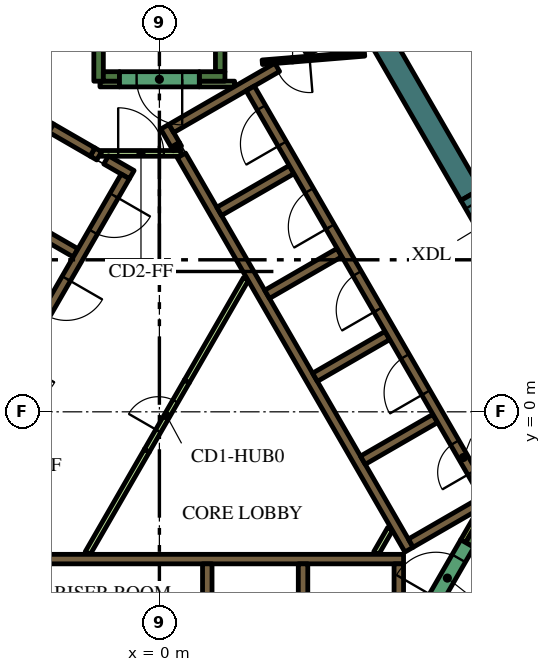
"""IFC4 building model, lengths in metres.
Left out: names, types, materials, properties, quantities, classifications, styles, units other than length and angle.
Written with IfcOpenShell. Run it as: python <this file> out.ifc"""

import sys

from ifc_helpers import new_model, si_unit, direction, frame, frame_2d, origin, place, context, subcontext, project, spatial, rectangle, extrude, element, fill, save


model = new_model("IFC4")
c1 = context("Model", 3, precision=1e-05, world=origin(), true_north=direction((0.0, 1.0)))
c2 = subcontext(c1, "Body", "Model", "MODEL_VIEW")
j1 = project(units=[si_unit("LENGTHUNIT", "METRE"), si_unit("PLANEANGLEUNIT", "RADIAN")], contexts=[c1])
p1 = place(None, origin())
s1 = spatial("IfcSite", under=j1, at=p1, CompositionType="ELEMENT")
p2 = place(p1, origin())
s2 = spatial("IfcBuilding", under=s1, at=p2, CompositionType="ELEMENT")
p3 = place(p2, frame((0.0, 0.0, 309.0)))
s3 = spatial("IfcBuildingStorey", under=s2, at=p3, CompositionType="ELEMENT", Elevation=309.0)
p4 = place(p3, frame((1.989, 16.456, 0.0), z_axis=(0.0, 0.0, 1.0), x_axis=(0.49999102663, -0.8660305845, 0.0)))
e1 = element("IfcWall", 1, at=p4, inside=s3, PredefinedType="SOLIDWALL", context=c2, shape_type="SweptSolid", body=[
    extrude(rectangle(XDim=12.406, YDim=0.6, at=frame_2d((6.203, 0.0))), origin(), (0.0, 0.0, 1.0), 4.2),
])
p5 = place(p3, frame((8.168, -3.503, 0.0), z_axis=(0.0, 0.0, 1.0), x_axis=(0.49972245349, 0.866185586049, 0.0)))
e2 = element("IfcWall", 2, at=p5, inside=s3, PredefinedType="SOLIDWALL", context=c2, shape_type="SweptSolid", body=[
    extrude(rectangle(XDim=0.425, YDim=0.25, at=frame_2d((0.212, 0.0))), origin(), (0.0, 0.0, 1.0), 4.2),
])
p6 = place(p3, frame((1.6, 8.95, 0.0), z_axis=(0.0, 0.0, 1.0), x_axis=(0.0, 1.0, 0.0)))
e3 = element("IfcWall", 3, at=p6, inside=s3, PredefinedType="SOLIDWALL", context=c2, shape_type="SweptSolid", body=[
    extrude(rectangle(XDim=6.8, YDim=0.25, at=frame_2d((3.4, 0.0))), origin(), (0.0, 0.0, 1.0), 4.2),
])
p7 = place(p3, frame((1.05, 8.825, 0.0), z_axis=(0.0, 0.0, 1.0), x_axis=(1.0, 0.0, 0.0)))
e4 = element("IfcWall", 4, at=p7, inside=s3, PredefinedType="SOLIDWALL", context=c2, shape_type="SweptSolid", body=[
    extrude(rectangle(XDim=0.675, YDim=0.25, at=frame_2d((0.337, 0.0))), origin(), (0.0, 0.0, 1.0), 4.2),
])
p8 = place(p3, frame((-1.6, 8.7, 0.0), z_axis=(0.0, 0.0, 1.0), x_axis=(0.0, 1.0, 0.0)))
e5 = element("IfcWall", 5, at=p8, inside=s3, PredefinedType="SOLIDWALL", context=c2, shape_type="SweptSolid", body=[
    extrude(rectangle(XDim=7.05, YDim=0.25, at=frame_2d((3.525, 0.0))), origin(), (0.0, 0.0, 1.0), 4.2),
])
p9 = place(p3, frame((-1.475, 8.825, 0.0), z_axis=(0.0, 0.0, 1.0), x_axis=(1.0, 0.0, 0.0)))
e6 = element("IfcWall", 6, at=p9, inside=s3, PredefinedType="SOLIDWALL", context=c2, shape_type="SweptSolid", body=[
    extrude(rectangle(XDim=0.425, YDim=0.25, at=frame_2d((0.212, 0.0))), origin(), (0.0, 0.0, 1.0), 4.2),
])
p10 = place(p3, frame((-5.545, -3.875, 0.0), z_axis=(0.0, 0.0, 1.0), x_axis=(1.0, 0.0, 0.0)))
e7 = element("IfcWall", 7, at=p10, inside=s3, PredefinedType="SOLIDWALL", context=c2, shape_type="SweptSolid", body=[
    extrude(rectangle(XDim=11.97, YDim=0.25, at=frame_2d((5.985, 0.0))), origin(), (0.0, 0.0, 1.0), 4.2),
])
p11 = place(p3, frame((6.3, -7.24, 0.0), z_axis=(0.0, 0.0, 1.0), x_axis=(0.0, 1.0, 0.0)))
e8 = element("IfcWall", 8, at=p11, inside=s3, PredefinedType="SOLIDWALL", context=c2, shape_type="SweptSolid", body=[
    extrude(rectangle(XDim=3.24, YDim=0.25, at=frame_2d((1.62, 0.0))), origin(), (0.0, 0.0, 1.0), 4.2),
])
for number, where, z_axis, x_axis in (
    (9, (3.78, -4.0, 0.0), (0.0, 0.0, 1.0), (0.0, -1.0, 0.0)),
    (10, (1.26, -4.0, 0.0), (0.0, 0.0, 1.0), (0.0, -1.0, 0.0)),
):
    element("IfcWall", number, at=place(p3, frame(where, z_axis=z_axis, x_axis=x_axis)), inside=s3, PredefinedType="SOLIDWALL", context=c2, shape_type="SweptSolid", body=[
        extrude(rectangle(XDim=2.2, YDim=0.25, at=frame_2d((1.1, 0.0))), origin(), (0.0, 0.0, 1.0), 4.2),
    ])
p12 = place(p3, frame((0.473, 6.93, 0.0), z_axis=(0.0, 0.0, 1.0), x_axis=(-0.49972245349, 0.866185586049, 0.0)))
e11 = element("IfcWall", 11, at=p12, inside=s3, PredefinedType="SOLIDWALL", context=c2, shape_type="SweptSolid", body=[
    extrude(rectangle(XDim=0.11, YDim=0.25, at=frame_2d((0.055, 0.0))), origin(), (0.0, 0.0, 1.0), 4.2),
])
p13 = place(p3, frame((6.568, -3.627, 0.0), z_axis=(0.0, 0.0, 1.0), x_axis=(-0.499999455981, 0.866025717874, 0.0)))
e12 = element("IfcWall", 12, at=p13, inside=s3, PredefinedType="SOLIDWALL", context=c2, shape_type="SweptSolid", body=[
    extrude(rectangle(XDim=11.978, YDim=0.25, at=frame_2d((5.989, 0.0))), origin(), (0.0, 0.0, 1.0), 4.2),
])
p14 = place(p3, frame((0.417, 7.027, 0.0), z_axis=(0.0, 0.0, 1.0), x_axis=(-0.500210807569, 0.865903659763, 0.0)))
e13 = element("IfcWall", 13, at=p14, inside=s3, PredefinedType="SOLIDWALL", context=c2, shape_type="SweptSolid", body=[
    extrude(rectangle(XDim=0.548, YDim=0.25, at=frame_2d((0.274, 0.0))), origin(), (0.0, 0.0, 1.0), 4.2),
])
p15 = place(p3, frame((3.1, 9.064, 0.0), z_axis=(0.0, 0.0, 1.0), x_axis=(-0.866030133475, -0.499991807846, 0.0)))
e14 = element("IfcWall", 14, at=p15, inside=s3, PredefinedType="SOLIDWALL", context=c2, shape_type="SweptSolid", body=[
    extrude(rectangle(XDim=3.217, YDim=0.25, at=frame_2d((1.608, 0.0))), origin(), (0.0, 0.0, 1.0), 4.2),
])
p16 = place(p3, frame((1.574, 5.274, 0.0), z_axis=(0.0, 0.0, 1.0), x_axis=(0.866028486751, 0.499994660107, 0.0)))
e15 = element("IfcWall", 15, at=p16, inside=s3, PredefinedType="SOLIDWALL", context=c2, shape_type="SweptSolid", body=[
    extrude(rectangle(XDim=2.2, YDim=0.25, at=frame_2d((1.1, 0.0))), origin(), (0.0, 0.0, 1.0), 4.2),
])
for number, where, z_axis, x_axis in (
    (16, (2.834, 3.091, 0.0), (0.0, 0.0, 1.0), (0.866, 0.5, 0.0)),
    (17, (4.094, 0.909, 0.0), (0.0, 0.0, 1.0), (0.866, 0.5, 0.0)),
    (18, (5.354, -1.274, 0.0), (0.0, 0.0, 1.0), (0.866, 0.5, 0.0)),
):
    element("IfcWall", number, at=place(p3, frame(where, z_axis=z_axis, x_axis=x_axis)), inside=s3, PredefinedType="SOLIDWALL", context=c2, shape_type="SweptSolid", body=[
        extrude(rectangle(XDim=2.2, YDim=0.25, at=frame_2d((1.1, 0.0))), origin(), (0.0, 0.0, 1.0), 4.2),
    ])
p17 = place(p3, frame((6.614, -3.456, 0.0), z_axis=(0.0, 0.0, 1.0), x_axis=(0.866032512851, 0.499987686533, 0.0)))
e19 = element("IfcWall", 19, at=p17, inside=s3, PredefinedType="SOLIDWALL", context=c2, shape_type="SweptSolid", body=[
    extrude(rectangle(XDim=2.975, YDim=0.25, at=frame_2d((1.487, 0.0))), origin(), (0.0, 0.0, 1.0), 4.2),
])
p18 = place(p3, frame((3.83, 9.486, 0.0), z_axis=(0.0, 0.0, 1.0), x_axis=(0.865986202621, 0.500067892261, 0.0)))
e20 = element("IfcWall", 20, at=p18, inside=s3, PredefinedType="SOLIDWALL", context=c2, shape_type="SweptSolid", body=[
    extrude(rectangle(XDim=1.591, YDim=0.25, at=frame_2d((0.795, 0.0))), origin(), (0.0, 0.0, 1.0), 4.2),
])
p19 = place(p3, frame((-8.06, -1.311, 0.0), z_axis=(0.0, 0.0, 1.0), x_axis=(0.50000273126, 0.866023826885, 0.0)))
e21 = element("IfcWall", 21, at=p19, inside=s3, PredefinedType="SOLIDWALL", context=c2, shape_type="SweptSolid", body=[
    extrude(rectangle(XDim=10.33, YDim=0.25, at=frame_2d((5.165, 0.0))), origin(), (0.0, 0.0, 1.0), 4.2),
])
p20 = place(p3, frame((-1.758, 6.835, 0.0), z_axis=(0.0, 0.0, 1.0), x_axis=(0.865982457891, -0.500074377092, 0.0)))
e22 = element("IfcWall", 22, at=p20, inside=s3, PredefinedType="SOLIDWALL", context=c2, shape_type="SweptSolid", body=[
    extrude(rectangle(XDim=0.2, YDim=0.25, at=frame_2d((0.1, 0.0))), origin(), (0.0, 0.0, 1.0), 4.2),
])
p21 = place(p3, frame((-1.76, 6.836, 0.0), z_axis=(0.0, 0.0, 1.0), x_axis=(-0.865952863304, 0.500125622755, 0.0)))
e23 = element("IfcWall", 23, at=p21, inside=s3, PredefinedType="SOLIDWALL", context=c2, shape_type="SweptSolid", body=[
    extrude(rectangle(XDim=1.258, YDim=0.25, at=frame_2d((0.629, 0.0))), origin(), (0.0, 0.0, 1.0), 4.2),
])
p22 = place(p3, frame((-0.728, 6.24, 0.0), z_axis=(0.0, 0.0, 1.0), x_axis=(-0.865955664968, 0.500120771724, 0.0)))
e24 = element("IfcWall", 24, at=p22, inside=s3, PredefinedType="SOLIDWALL", context=c2, shape_type="SweptSolid", body=[
    extrude(rectangle(XDim=0.778, YDim=0.25, at=frame_2d((0.389, 0.0))), origin(), (0.0, 0.0, 1.0), 4.2),
])
p23 = place(p3, frame((-2.204, 4.182, 0.0), z_axis=(0.0, 0.0, 1.0), x_axis=(-0.866008176907, 0.50002983664, 0.0)))
e25 = element("IfcWall", 25, at=p23, inside=s3, PredefinedType="SOLIDWALL", context=c2, shape_type="SweptSolid", body=[
    extrude(rectangle(XDim=2.2, YDim=0.25, at=frame_2d((1.1, 0.0))), origin(), (0.0, 0.0, 1.0), 4.2),
])
p24 = place(p3, frame((1.05, 8.625, 0.0), z_axis=(0.0, 0.0, 1.0), x_axis=(1.0, 0.0, 0.0)))
e26 = element("IfcWall", 26, at=p24, inside=s3, PredefinedType="PARTITIONING", context=c2, shape_type="SweptSolid", body=[
    extrude(rectangle(XDim=0.929, YDim=0.15, at=frame_2d((0.464, 0.0))), origin(), (0.0, 0.0, 1.0), 3.55),
])
p25 = place(p3, frame((-1.564, 8.625, 0.0), z_axis=(0.0, 0.0, 1.0), x_axis=(1.0, 0.0, 0.0)))
e27 = element("IfcWall", 27, at=p25, inside=s3, PredefinedType="PARTITIONING", context=c2, shape_type="SweptSolid", body=[
    extrude(rectangle(XDim=0.514, YDim=0.15, at=frame_2d((0.257, 0.0))), origin(), (0.0, 0.0, 1.0), 3.55),
])
p26 = place(p3, frame((8.459, -2.599, 0.0), z_axis=(0.0, 0.0, 1.0), x_axis=(-0.500041054325, -0.866001699761, 0.0)))
e28 = element("IfcWall", 28, at=p26, inside=s3, PredefinedType="PARTITIONING", context=c2, shape_type="SweptSolid", body=[
    extrude(rectangle(XDim=0.929, YDim=0.15, at=frame_2d((0.464, 0.0))), origin(), (0.0, 0.0, 1.0), 4.2),
])
p27 = place(p3, frame((5.705, -3.718, 0.0), z_axis=(0.0, 0.0, 1.0), x_axis=(0.499962090823, 0.866047289552, 0.0)))
e29 = element("IfcWall", 29, at=p27, inside=s3, PredefinedType="PARTITIONING", context=c2, shape_type="SweptSolid", body=[
    extrude(rectangle(XDim=0.735, YDim=0.15, at=frame_2d((0.367, 0.0))), origin(), (0.0, 0.0, 1.0), 3.55),
])
p28 = place(p3, frame((-1.887, -3.718, 0.0), z_axis=(0.0, 0.0, 1.0), x_axis=(0.500043732237, 0.866000153493, 0.0)))
e30 = element("IfcWall", 30, at=p28, inside=s3, PredefinedType="PARTITIONING", context=c2, shape_type="SweptSolid", body=[
    extrude(rectangle(XDim=3.114, YDim=0.15, at=frame_2d((1.557, 0.0))), origin(), (0.0, 0.0, 1.0), 3.55),
])
p29 = place(p3, frame((0.72, 0.797, 0.0), z_axis=(0.0, 0.0, 1.0), x_axis=(0.499984921984, 0.866034108906, 0.0)))
e31 = element("IfcWall", 31, at=p29, inside=s3, PredefinedType="PARTITIONING", context=c2, shape_type="SweptSolid", body=[
    extrude(rectangle(XDim=3.113, YDim=0.15, at=frame_2d((1.557, 0.0))), origin(), (0.0, 0.0, 1.0), 3.55),
])
p30 = place(p3, frame((8.565, -2.185, 0.0), z_axis=(0.0, 0.0, 1.0), x_axis=(-0.499997954832, 0.866026584559, 0.0)))
e32 = element("IfcWall", 32, at=p30, inside=s3, PredefinedType="SOLIDWALL", context=c2, shape_type="SweptSolid", body=[
    extrude(rectangle(XDim=12.35, YDim=0.25, at=frame_2d((6.175, 0.0))), origin(), (0.0, 0.0, 1.0), 4.2),
])
p31 = place(p30, frame((0.685, 0.0, 0.0)))
e33 = element("IfcOpeningElement", 33, at=p31, cuts=e32, PredefinedType="OPENING", context=c2, shape_type="SweptSolid", body=[
    extrude(rectangle(XDim=0.9, YDim=2.1, at=frame_2d((0.45, 1.05))), frame((0.0, 0.135, 0.0), z_axis=(0.0, -1.0, 0.0), x_axis=(1.0, 0.0, 0.0)), (0.0, 0.0, 1.0), 0.27),
])
p32 = place(p30, frame((3.105, 0.0, 0.0)))
e34 = element("IfcOpeningElement", 34, at=p32, cuts=e32, PredefinedType="OPENING", context=c2, shape_type="SweptSolid", body=[
    extrude(rectangle(XDim=1.1, YDim=2.1, at=frame_2d((0.55, 1.05))), frame((0.0, 0.135, 0.0), z_axis=(0.0, -1.0, 0.0), x_axis=(1.0, 0.0, 0.0)), (0.0, 0.0, 1.0), 0.27),
])
p33 = place(p30, frame((5.625, 0.0, 0.0)))
e35 = element("IfcOpeningElement", 35, at=p33, cuts=e32, PredefinedType="OPENING", context=c2, shape_type="SweptSolid", body=[
    extrude(rectangle(XDim=1.1, YDim=2.1, at=frame_2d((0.55, 1.05))), frame((0.0, 0.135, 0.0), z_axis=(0.0, -1.0, 0.0), x_axis=(1.0, 0.0, 0.0)), (0.0, 0.0, 1.0), 0.27),
])
p34 = place(p30, frame((8.145, 0.0, 0.0)))
e36 = element("IfcOpeningElement", 36, at=p34, cuts=e32, PredefinedType="OPENING", context=c2, shape_type="SweptSolid", body=[
    extrude(rectangle(XDim=1.1, YDim=2.1, at=frame_2d((0.55, 1.05))), frame((0.0, 0.135, 0.0), z_axis=(0.0, -1.0, 0.0), x_axis=(1.0, 0.0, 0.0)), (0.0, 0.0, 1.0), 0.27),
])
p35 = place(p30, frame((10.665, 0.0, 0.0)))
e37 = element("IfcOpeningElement", 37, at=p35, cuts=e32, PredefinedType="OPENING", context=c2, shape_type="SweptSolid", body=[
    extrude(rectangle(XDim=1.1, YDim=2.1, at=frame_2d((0.55, 1.05))), frame((0.0, 0.135, 0.0), z_axis=(0.0, -1.0, 0.0), x_axis=(1.0, 0.0, 0.0)), (0.0, 0.0, 1.0), 0.27),
])
p36 = place(p3, frame((-0.898, 6.194, 0.0), z_axis=(0.0, 0.0, 1.0), x_axis=(-0.499996202215, -0.866027596426, 0.0)))
e38 = element("IfcWall", 38, at=p36, inside=s3, PredefinedType="SOLIDWALL", context=c2, shape_type="SweptSolid", body=[
    extrude(rectangle(XDim=9.83, YDim=0.25, at=frame_2d((4.915, 0.0))), origin(), (0.0, 0.0, 1.0), 4.2),
])
p37 = place(p36, frame((0.585, 0.0, 0.0)))
e39 = element("IfcOpeningElement", 39, at=p37, cuts=e38, PredefinedType="OPENING", context=c2, shape_type="SweptSolid", body=[
    extrude(rectangle(XDim=1.1, YDim=2.1, at=frame_2d((0.55, 1.05))), frame((0.0, 0.135, 0.0), z_axis=(0.0, -1.0, 0.0), x_axis=(1.0, 0.0, 0.0)), (0.0, 0.0, 1.0), 0.27),
])
p38 = place(p36, frame((3.105, 0.0, 0.0)))
e40 = element("IfcOpeningElement", 40, at=p38, cuts=e38, PredefinedType="OPENING", context=c2, shape_type="SweptSolid", body=[
    extrude(rectangle(XDim=1.1, YDim=2.1, at=frame_2d((0.55, 1.05))), frame((0.0, 0.135, 0.0), z_axis=(0.0, -1.0, 0.0), x_axis=(1.0, 0.0, 0.0)), (0.0, 0.0, 1.0), 0.27),
])
p39 = place(p36, frame((5.625, 0.0, 0.0)))
e41 = element("IfcOpeningElement", 41, at=p39, cuts=e38, PredefinedType="OPENING", context=c2, shape_type="SweptSolid", body=[
    extrude(rectangle(XDim=1.1, YDim=2.1, at=frame_2d((0.55, 1.05))), frame((0.0, 0.135, 0.0), z_axis=(0.0, -1.0, 0.0), x_axis=(1.0, 0.0, 0.0)), (0.0, 0.0, 1.0), 0.27),
])
p40 = place(p36, frame((8.145, 0.0, 0.0)))
e42 = element("IfcOpeningElement", 42, at=p40, cuts=e38, PredefinedType="OPENING", context=c2, shape_type="SweptSolid", body=[
    extrude(rectangle(XDim=1.1, YDim=2.1, at=frame_2d((0.55, 1.05))), frame((0.0, 0.135, 0.0), z_axis=(0.0, -1.0, 0.0), x_axis=(1.0, 0.0, 0.0)), (0.0, 0.0, 1.0), 0.27),
])
p41 = place(p3, frame((7.053, -5.284, 0.0), z_axis=(0.0, 0.0, 1.0), x_axis=(0.500078061341, 0.865980330357, 0.0)))
e43 = element("IfcWall", 43, at=p41, inside=s3, PredefinedType="SOLIDWALL", context=c2, shape_type="SweptSolid", body=[
    extrude(rectangle(XDim=2.1, YDim=0.4, at=frame_2d((1.05, 0.0))), origin(), (0.0, 0.0, 1.0), 4.2),
])
p42 = place(p41, frame((0.45, 0.0, 0.0)))
e44 = element("IfcOpeningElement", 44, at=p42, cuts=e43, PredefinedType="OPENING", context=c2, shape_type="SweptSolid", body=[
    extrude(rectangle(XDim=1.2, YDim=2.1, at=frame_2d((0.6, 1.05))), frame((0.0, 0.21, 0.0), z_axis=(0.0, -1.0, 0.0), x_axis=(1.0, 0.0, 0.0)), (0.0, 0.0, 1.0), 0.42),
])
p43 = place(p3, frame((1.05, 8.75, 0.0), z_axis=(0.0, 0.0, 1.0), x_axis=(-1.0, 0.0, 0.0)))
e45 = element("IfcWall", 45, at=p43, inside=s3, PredefinedType="SOLIDWALL", context=c2, shape_type="SweptSolid", body=[
    extrude(rectangle(XDim=2.1, YDim=0.4, at=frame_2d((1.05, 0.0))), origin(), (0.0, 0.0, 1.0), 4.2),
])
p44 = place(p43, frame((0.45, 0.0, 0.0)))
e46 = element("IfcOpeningElement", 46, at=p44, cuts=e45, PredefinedType="OPENING", context=c2, shape_type="SweptSolid", body=[
    extrude(rectangle(XDim=1.2, YDim=2.1, at=frame_2d((0.6, 1.05))), frame((0.0, 0.21, 0.0), z_axis=(0.0, -1.0, 0.0), x_axis=(1.0, 0.0, 0.0)), (0.0, 0.0, 1.0), 0.42),
])
p45 = place(p3, frame((5.398, 9.419, 0.0), z_axis=(0.0, 0.0, 1.0), x_axis=(-0.996653416376, -0.081743303248, 0.0)))
e47 = element("IfcWall", 47, at=p45, inside=s3, PredefinedType="PARTITIONING", context=c2, shape_type="SweptSolid", body=[
    extrude(rectangle(XDim=2.7, YDim=0.12, at=frame_2d((1.35, 0.0))), origin(), (0.0, 0.0, 1.0), 3.55),
])
p46 = place(p45, frame((1.45, 0.0, 0.0)))
e48 = element("IfcOpeningElement", 48, at=p46, cuts=e47, PredefinedType="OPENING", context=c2, shape_type="SweptSolid", body=[
    extrude(rectangle(XDim=0.9, YDim=2.1, at=frame_2d((0.45, 1.05))), frame((0.0, 0.07, 0.0), z_axis=(0.0, -1.0, 0.0), x_axis=(1.0, 0.0, 0.0)), (0.0, 0.0, 1.0), 0.14),
])
p47 = place(p3, frame((-0.33, -1.022, 0.0), z_axis=(0.0, 0.0, 1.0), x_axis=(0.500027713859, 0.866009402589, 0.0)))
e49 = element("IfcWall", 49, at=p47, inside=s3, PredefinedType="PARTITIONING", context=c2, shape_type="SweptSolid", body=[
    extrude(rectangle(XDim=2.1, YDim=0.15, at=frame_2d((1.05, 0.0))), origin(), (0.0, 0.0, 1.0), 3.55),
])
p48 = place(p47, frame((0.6, 0.0, 0.0)))
e50 = element("IfcOpeningElement", 50, at=p48, cuts=e49, PredefinedType="OPENING", context=c2, shape_type="SweptSolid", body=[
    extrude(rectangle(XDim=0.9, YDim=2.1, at=frame_2d((0.45, 1.05))), frame((0.0, 0.085, 0.0), z_axis=(0.0, -1.0, 0.0), x_axis=(1.0, 0.0, 0.0)), (0.0, 0.0, 1.0), 0.17),
])
p49 = place(p3, frame((-1.534, 6.8, 0.0), z_axis=(0.0, 0.0, 1.0), x_axis=(1.0, 0.0, 0.0)))
e51 = element("IfcWall", 51, at=p49, inside=s3, PredefinedType="PARTITIONING", context=c2, shape_type="SweptSolid", body=[
    extrude(rectangle(XDim=2.1, YDim=0.15, at=frame_2d((1.05, 0.0))), origin(), (0.0, 0.0, 1.0), 3.55),
])
p50 = place(p49, frame((0.45, 0.0, 0.0)))
e52 = element("IfcOpeningElement", 52, at=p50, cuts=e51, PredefinedType="OPENING", context=c2, shape_type="SweptSolid", body=[
    extrude(rectangle(XDim=1.2, YDim=2.1, at=frame_2d((0.6, 1.05))), frame((0.0, 0.085, 0.0), z_axis=(0.0, -1.0, 0.0), x_axis=(1.0, 0.0, 0.0)), (0.0, 0.0, 1.0), 0.17),
])
p51 = place(p3, frame((8.192, 5.711, 0.0), z_axis=(0.0, 0.0, 1.0), x_axis=(0.500062241894, -0.865989465428, 0.0)))
e53 = element("IfcWall", 53, at=p51, inside=s3, PredefinedType="SOLIDWALL", context=c2, shape_type="SweptSolid", body=[
    extrude(rectangle(XDim=1.7, YDim=0.6, at=frame_2d((0.85, 0.0))), origin(), (0.0, 0.0, 1.0), 4.2),
])
p52 = place(p51, frame((0.25, 0.0, 0.0)))
e54 = element("IfcOpeningElement", 54, at=p52, cuts=e53, PredefinedType="OPENING", context=c2, shape_type="SweptSolid", body=[
    extrude(rectangle(XDim=1.2, YDim=2.1, at=frame_2d((0.6, 1.05))), frame((0.0, 0.31, 0.0), z_axis=(0.0, -1.0, 0.0), x_axis=(1.0, 0.0, 0.0)), (0.0, 0.0, 1.0), 0.62),
])
p53 = place(p3, frame((10.385, 6.112, 0.0), z_axis=(0.0, 0.0, 1.0), x_axis=(-0.499988222896, 0.866032203192, 0.0)))
e55 = element("IfcWall", 55, at=p53, inside=s3, PredefinedType="PARTITIONING", context=c2, shape_type="SweptSolid", body=[
    extrude(rectangle(XDim=4.4, YDim=0.2, at=frame_2d((2.2, 0.0))), origin(), (0.0, 0.0, 1.0), 3.55),
])
p54 = place(p31, origin())
e56 = element("IfcDoor", 56, at=p54, inside=s3, OperationType="SINGLE_SWING_LEFT", PredefinedType="DOOR", context=c2, shape_type="SweptSolid", body=[
    extrude(rectangle(XDim=0.9, YDim=2.1, at=frame_2d((0.45, 1.05))), frame((0.0, 0.025, 0.0), z_axis=(0.0, -1.0, 0.0), x_axis=(1.0, 0.0, 0.0)), (0.0, 0.0, 1.0), 0.05),
])
fill(e33, e56)
p55 = place(p32, origin())
e57 = element("IfcDoor", 57, at=p55, inside=s3, OperationType="DOUBLE_DOOR_SLIDING", PredefinedType="DOOR", context=c2, shape_type="SweptSolid", body=[
    extrude(rectangle(XDim=1.1, YDim=2.1, at=frame_2d((0.55, 1.05))), frame((0.0, 0.025, 0.0), z_axis=(0.0, -1.0, 0.0), x_axis=(1.0, 0.0, 0.0)), (0.0, 0.0, 1.0), 0.05),
])
fill(e34, e57)
p56 = place(p33, origin())
e58 = element("IfcDoor", 58, at=p56, inside=s3, OperationType="DOUBLE_DOOR_SLIDING", PredefinedType="DOOR", context=c2, shape_type="SweptSolid", body=[
    extrude(rectangle(XDim=1.1, YDim=2.1, at=frame_2d((0.55, 1.05))), frame((0.0, 0.025, 0.0), z_axis=(0.0, -1.0, 0.0), x_axis=(1.0, 0.0, 0.0)), (0.0, 0.0, 1.0), 0.05),
])
fill(e35, e58)
p57 = place(p34, origin())
e59 = element("IfcDoor", 59, at=p57, inside=s3, OperationType="DOUBLE_DOOR_SLIDING", PredefinedType="DOOR", context=c2, shape_type="SweptSolid", body=[
    extrude(rectangle(XDim=1.1, YDim=2.1, at=frame_2d((0.55, 1.05))), frame((0.0, 0.025, 0.0), z_axis=(0.0, -1.0, 0.0), x_axis=(1.0, 0.0, 0.0)), (0.0, 0.0, 1.0), 0.05),
])
fill(e36, e59)
p58 = place(p35, origin())
e60 = element("IfcDoor", 60, at=p58, inside=s3, OperationType="DOUBLE_DOOR_SLIDING", PredefinedType="DOOR", context=c2, shape_type="SweptSolid", body=[
    extrude(rectangle(XDim=1.1, YDim=2.1, at=frame_2d((0.55, 1.05))), frame((0.0, 0.025, 0.0), z_axis=(0.0, -1.0, 0.0), x_axis=(1.0, 0.0, 0.0)), (0.0, 0.0, 1.0), 0.05),
])
fill(e37, e60)
p59 = place(p37, origin())
e61 = element("IfcDoor", 61, at=p59, inside=s3, OperationType="DOUBLE_DOOR_SLIDING", PredefinedType="DOOR", context=c2, shape_type="SweptSolid", body=[
    extrude(rectangle(XDim=1.1, YDim=2.1, at=frame_2d((0.55, 1.05))), frame((0.0, 0.025, 0.0), z_axis=(0.0, -1.0, 0.0), x_axis=(1.0, 0.0, 0.0)), (0.0, 0.0, 1.0), 0.05),
])
fill(e39, e61)
p60 = place(p38, origin())
e62 = element("IfcDoor", 62, at=p60, inside=s3, OperationType="DOUBLE_DOOR_SLIDING", PredefinedType="DOOR", context=c2, shape_type="SweptSolid", body=[
    extrude(rectangle(XDim=1.1, YDim=2.1, at=frame_2d((0.55, 1.05))), frame((0.0, 0.025, 0.0), z_axis=(0.0, -1.0, 0.0), x_axis=(1.0, 0.0, 0.0)), (0.0, 0.0, 1.0), 0.05),
])
fill(e40, e62)
p61 = place(p42, origin())
e63 = element("IfcDoor", 63, at=p61, inside=s3, OperationType="SINGLE_SWING_LEFT", PredefinedType="DOOR", context=c2, shape_type="SweptSolid", body=[
    extrude(rectangle(XDim=1.2, YDim=2.1, at=frame_2d((0.6, 1.05))), frame((0.0, 0.025, 0.0), z_axis=(0.0, -1.0, 0.0), x_axis=(1.0, 0.0, 0.0)), (0.0, 0.0, 1.0), 0.05),
])
fill(e44, e63)
p62 = place(p44, origin())
e64 = element("IfcDoor", 64, at=p62, inside=s3, OperationType="SINGLE_SWING_LEFT", PredefinedType="DOOR", context=c2, shape_type="SweptSolid", body=[
    extrude(rectangle(XDim=1.2, YDim=2.1, at=frame_2d((0.6, 1.05))), frame((0.0, 0.025, 0.0), z_axis=(0.0, -1.0, 0.0), x_axis=(1.0, 0.0, 0.0)), (0.0, 0.0, 1.0), 0.05),
])
fill(e46, e64)
p63 = place(p46, origin())
e65 = element("IfcDoor", 65, at=p63, inside=s3, OperationType="SINGLE_SWING_LEFT", PredefinedType="DOOR", context=c2, shape_type="SweptSolid", body=[
    extrude(rectangle(XDim=0.9, YDim=2.1, at=frame_2d((0.45, 1.05))), frame((0.0, 0.025, 0.0), z_axis=(0.0, -1.0, 0.0), x_axis=(1.0, 0.0, 0.0)), (0.0, 0.0, 1.0), 0.05),
])
fill(e48, e65)
p64 = place(p48, origin())
e66 = element("IfcDoor", 66, at=p64, inside=s3, OperationType="SINGLE_SWING_LEFT", PredefinedType="DOOR", context=c2, shape_type="SweptSolid", body=[
    extrude(rectangle(XDim=0.9, YDim=2.1, at=frame_2d((0.45, 1.05))), frame((0.0, 0.025, 0.0), z_axis=(0.0, -1.0, 0.0), x_axis=(1.0, 0.0, 0.0)), (0.0, 0.0, 1.0), 0.05),
])
fill(e50, e66)
p65 = place(p50, origin())
e67 = element("IfcDoor", 67, at=p65, inside=s3, OperationType="SINGLE_SWING_LEFT", PredefinedType="DOOR", context=c2, shape_type="SweptSolid", body=[
    extrude(rectangle(XDim=1.2, YDim=2.1, at=frame_2d((0.6, 1.05))), frame((0.0, 0.025, 0.0), z_axis=(0.0, -1.0, 0.0), x_axis=(1.0, 0.0, 0.0)), (0.0, 0.0, 1.0), 0.05),
])
fill(e52, e67)
save(model, sys.argv[1])
